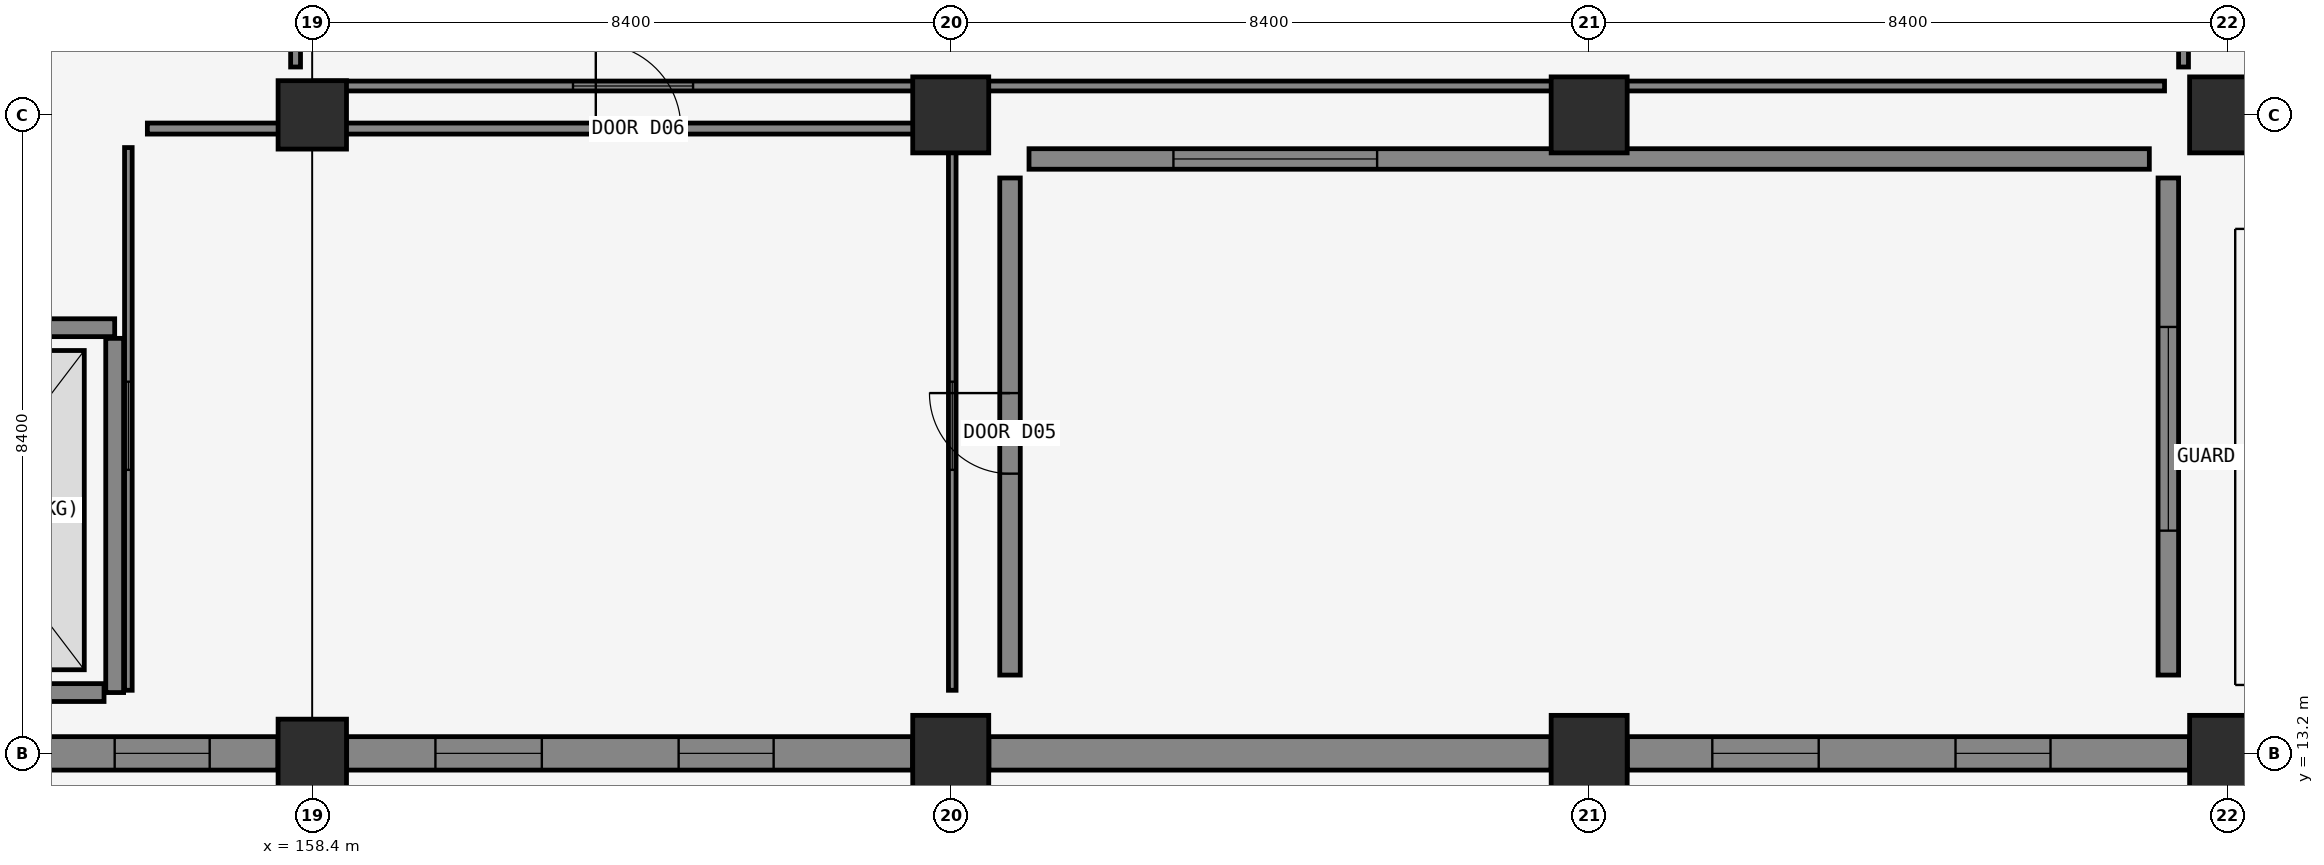
"""IFC4 building model, lengths in metres.
Left out: names, types, materials, properties, quantities, classifications, styles, units other than length and angle.
Written with IfcOpenShell. Run it as: python <this file> out.ifc"""

import sys

from ifc_helpers import new_model, si_unit, direction, frame, frame_2d, origin, origin_2d, place, context, subcontext, project, spatial, rectangle, extrude, element, fill, save


model = new_model("IFC4")
c1 = context("Model", 3, precision=1e-05, world=origin(), true_north=direction((0.0, 1.0)))
c2 = subcontext(c1, "Body", "Model", "MODEL_VIEW")
j1 = project(units=[si_unit("LENGTHUNIT", "METRE"), si_unit("PLANEANGLEUNIT", "RADIAN")], contexts=[c1])
p1 = place(None, origin())
s1 = spatial("IfcSite", under=j1, at=p1, CompositionType="ELEMENT")
p2 = place(p1, origin())
s2 = spatial("IfcBuilding", under=s1, at=p2, CompositionType="ELEMENT")
p3 = place(p2, origin())
s3 = spatial("IfcBuildingStorey", under=s2, at=p3, CompositionType="ELEMENT", Elevation=0.0)
for number, where, z_axis, x_axis in (
    (1, (158.4, 13.2, 0.0), (0.0, 0.0, 1.0), (1.0, 0.0, 0.0)),
    (2, (158.4, 21.6, 0.0), (0.0, 0.0, 1.0), (1.0, 0.0, 0.0)),
):
    element("IfcColumn", number, at=place(p3, frame(where, z_axis=z_axis, x_axis=x_axis)), inside=s3, PredefinedType="COLUMN", context=c2, shape_type="SweptSolid", body=[
        extrude(rectangle(XDim=0.9, YDim=0.9, at=origin_2d()), origin(), (0.0, 0.0, 1.0), 5.4),
    ])
for number, where, z_axis, x_axis in (
    (3, (166.8, 13.2, 0.0), (0.0, 0.0, 1.0), (1.0, 0.0, 0.0)),
    (4, (166.8, 21.6, 0.0), (0.0, 0.0, 1.0), (1.0, 0.0, 0.0)),
    (5, (175.2, 13.2, 0.0), (0.0, 0.0, 1.0), (1.0, 0.0, 0.0)),
    (6, (175.2, 21.6, 0.0), (0.0, 0.0, 1.0), (1.0, 0.0, 0.0)),
    (7, (183.6, 13.2, 0.0), (0.0, 0.0, 1.0), (1.0, 0.0, 0.0)),
    (8, (183.6, 21.6, 0.0), (0.0, 0.0, 1.0), (1.0, 0.0, 0.0)),
):
    element("IfcColumn", number, at=place(p3, frame(where, z_axis=z_axis, x_axis=x_axis)), inside=s3, PredefinedType="COLUMN", context=c2, shape_type="SweptSolid", body=[
        extrude(rectangle(XDim=1.0, YDim=1.0, at=origin_2d()), origin(), (0.0, 0.0, 1.0), 5.4),
    ])
p4 = place(p3, frame((151.412, 13.2, 0.0), z_axis=(0.0, 0.0, 1.0), x_axis=(1.0, 0.0, 0.0)))
e9 = element("IfcWall", 9, at=p4, inside=s3, PredefinedType="SOLIDWALL", context=c2, shape_type="SweptSolid", body=[
    extrude(rectangle(XDim=6.536, YDim=0.44, at=frame_2d((3.268, 0.0))), origin(), (0.0, 0.0, 1.0), 4.44),
])
p5 = place(p4, frame((1.188, 0.0, 0.9)))
e10 = element("IfcOpeningElement", 10, at=p5, cuts=e9, PredefinedType="OPENING", context=c2, shape_type="SweptSolid", body=[
    extrude(rectangle(XDim=1.4, YDim=2.2, at=frame_2d((0.7, 1.1))), frame((0.0, 0.23, 0.0), z_axis=(0.0, -1.0, 0.0), x_axis=(1.0, 0.0, 0.0)), (0.0, 0.0, 1.0), 0.46),
])
p6 = place(p4, frame((4.388, 0.0, 0.9)))
e11 = element("IfcOpeningElement", 11, at=p6, cuts=e9, PredefinedType="OPENING", context=c2, shape_type="SweptSolid", body=[
    extrude(rectangle(XDim=1.25, YDim=2.05, at=frame_2d((0.625, 1.025))), frame((0.0, 0.23, 0.0), z_axis=(0.0, -1.0, 0.0), x_axis=(1.0, 0.0, 0.0)), (0.0, 0.0, 1.0), 0.46),
])
p7 = place(p3, frame((158.852, 13.2, 0.0), z_axis=(0.0, 0.0, 1.0), x_axis=(1.0, 0.0, 0.0)))
e12 = element("IfcWall", 12, at=p7, inside=s3, PredefinedType="SOLIDWALL", context=c2, shape_type="SweptSolid", body=[
    extrude(rectangle(XDim=7.446, YDim=0.44, at=frame_2d((3.723, 0.0))), origin(), (0.0, 0.0, 1.0), 4.69),
])
p8 = place(p7, frame((1.168, 0.0, 0.9)))
e13 = element("IfcOpeningElement", 13, at=p8, cuts=e12, PredefinedType="OPENING", context=c2, shape_type="SweptSolid", body=[
    extrude(rectangle(XDim=1.4, YDim=2.2, at=frame_2d((0.7, 1.1))), frame((0.0, 0.23, 0.0), z_axis=(0.0, -1.0, 0.0), x_axis=(1.0, 0.0, 0.0)), (0.0, 0.0, 1.0), 0.46),
])
p9 = place(p7, frame((4.368, 0.0, 0.9)))
e14 = element("IfcOpeningElement", 14, at=p9, cuts=e12, PredefinedType="OPENING", context=c2, shape_type="SweptSolid", body=[
    extrude(rectangle(XDim=1.25, YDim=2.05, at=frame_2d((0.625, 1.025))), frame((0.0, 0.23, 0.0), z_axis=(0.0, -1.0, 0.0), x_axis=(1.0, 0.0, 0.0)), (0.0, 0.0, 1.0), 0.46),
])
p10 = place(p3, frame((167.302, 13.2, 0.0), z_axis=(0.0, 0.0, 1.0), x_axis=(1.0, 0.0, 0.0)))
e15 = element("IfcWall", 15, at=p10, inside=s3, PredefinedType="SOLIDWALL", context=c2, shape_type="SweptSolid", body=[
    extrude(rectangle(XDim=7.396, YDim=0.44, at=frame_2d((3.698, 0.0))), origin(), (0.0, 0.0, 1.0), 3.405),
])
p11 = place(p3, frame((175.702, 13.2, 0.0), z_axis=(0.0, 0.0, 1.0), x_axis=(1.0, 0.0, 0.0)))
e16 = element("IfcWall", 16, at=p11, inside=s3, PredefinedType="SOLIDWALL", context=c2, shape_type="SweptSolid", body=[
    extrude(rectangle(XDim=7.396, YDim=0.44, at=frame_2d((3.698, 0.0))), origin(), (0.0, 0.0, 1.0), 4.69),
])
p12 = place(p11, frame((1.118, 0.0, 0.9)))
e17 = element("IfcOpeningElement", 17, at=p12, cuts=e16, PredefinedType="OPENING", context=c2, shape_type="SweptSolid", body=[
    extrude(rectangle(XDim=1.4, YDim=2.2, at=frame_2d((0.7, 1.1))), frame((0.0, 0.23, 0.0), z_axis=(0.0, -1.0, 0.0), x_axis=(1.0, 0.0, 0.0)), (0.0, 0.0, 1.0), 0.46),
])
p13 = place(p11, frame((4.318, 0.0, 0.9)))
e18 = element("IfcOpeningElement", 18, at=p13, cuts=e16, PredefinedType="OPENING", context=c2, shape_type="SweptSolid", body=[
    extrude(rectangle(XDim=1.25, YDim=2.05, at=frame_2d((0.625, 1.025))), frame((0.0, 0.23, 0.0), z_axis=(0.0, -1.0, 0.0), x_axis=(1.0, 0.0, 0.0)), (0.0, 0.0, 1.0), 0.46),
])
p14 = place(p3, frame((151.8, 18.8, 0.0), z_axis=(0.0, 0.0, 1.0), x_axis=(1.0, 0.0, 0.0)))
e19 = element("IfcWall", 19, at=p14, inside=s3, PredefinedType="PARTITIONING", context=c2, shape_type="SweptSolid", body=[
    extrude(rectangle(XDim=4.0, YDim=0.235, at=frame_2d((2.0, 0.0))), origin(), (0.0, 0.0, 1.0), 5.04),
])
p15 = place(p14, frame((0.8, 0.0, 0.0)))
e20 = element("IfcOpeningElement", 20, at=p15, cuts=e19, PredefinedType="OPENING", context=c2, shape_type="SweptSolid", body=[
    extrude(rectangle(XDim=2.36, YDim=2.78, at=frame_2d((1.18, 1.39))), frame((0.0, 0.127, 0.0), z_axis=(0.0, -1.0, 0.0), x_axis=(1.0, 0.0, 0.0)), (0.0, 0.0, 1.0), 0.255),
])
p16 = place(p3, frame((155.8, 14.0, 0.0), z_axis=(0.0, 0.0, 1.0), x_axis=(0.0, 1.0, 0.0)))
e21 = element("IfcWall", 21, at=p16, inside=s3, PredefinedType="PARTITIONING", context=c2, shape_type="SweptSolid", body=[
    extrude(rectangle(XDim=4.66, YDim=0.235, at=frame_2d((2.33, 0.0))), origin(), (0.0, 0.0, 1.0), 5.04),
])
p17 = place(p3, frame((151.94, 14.0, 0.0), z_axis=(0.0, 0.0, 1.0), x_axis=(1.0, 0.0, 0.0)))
e22 = element("IfcWall", 22, at=p17, inside=s3, PredefinedType="PARTITIONING", context=c2, shape_type="SweptSolid", body=[
    extrude(rectangle(XDim=3.72, YDim=0.235, at=frame_2d((1.86, 0.0))), origin(), (0.0, 0.0, 1.0), 5.04),
])
p18 = place(p3, frame((167.58, 14.23, 0.0), z_axis=(0.0, 0.0, 1.0), x_axis=(0.0, 1.0, 0.0)))
e23 = element("IfcWall", 23, at=p18, inside=s3, PredefinedType="PARTITIONING", context=c2, shape_type="SweptSolid", body=[
    extrude(rectangle(XDim=6.54, YDim=0.27, at=frame_2d((3.27, 0.0))), origin(), (0.0, 0.0, 1.0), 5.04),
])
p19 = place(p18, frame((2.65, 0.0, 0.0)))
e24 = element("IfcOpeningElement", 24, at=p19, cuts=e23, PredefinedType="OPENING", context=c2, shape_type="SweptSolid", body=[
    extrude(rectangle(XDim=1.06, YDim=2.2, at=frame_2d((0.53, 1.1))), frame((0.0, 0.145, 0.0), z_axis=(0.0, -1.0, 0.0), x_axis=(1.0, 0.0, 0.0)), (0.0, 0.0, 1.0), 0.29),
])
p20 = place(p3, frame((167.83, 21.02, 0.0), z_axis=(0.0, 0.0, 1.0), x_axis=(1.0, 0.0, 0.0)))
e25 = element("IfcWall", 25, at=p20, inside=s3, PredefinedType="PARTITIONING", context=c2, shape_type="SweptSolid", body=[
    extrude(rectangle(XDim=14.74, YDim=0.27, at=frame_2d((7.37, 0.0))), origin(), (0.0, 0.0, 1.0), 5.04),
])
p21 = place(p20, frame((1.9, 0.0, 0.9)))
e26 = element("IfcOpeningElement", 26, at=p21, cuts=e25, PredefinedType="OPENING", context=c2, shape_type="SweptSolid", body=[
    extrude(rectangle(XDim=2.68, YDim=1.52, at=frame_2d((1.34, 0.76))), frame((0.0, 0.145, 0.0), z_axis=(0.0, -1.0, 0.0), x_axis=(1.0, 0.0, 0.0)), (0.0, 0.0, 1.0), 0.29),
])
p22 = place(p3, frame((182.82, 14.23, 0.0), z_axis=(0.0, 0.0, 1.0), x_axis=(0.0, 1.0, 0.0)))
e27 = element("IfcWall", 27, at=p22, inside=s3, PredefinedType="PARTITIONING", context=c2, shape_type="SweptSolid", body=[
    extrude(rectangle(XDim=6.54, YDim=0.27, at=frame_2d((3.27, 0.0))), origin(), (0.0, 0.0, 1.0), 5.04),
])
p23 = place(p22, frame((1.9, 0.0, 0.9)))
e28 = element("IfcOpeningElement", 28, at=p23, cuts=e27, PredefinedType="OPENING", context=c2, shape_type="SweptSolid", body=[
    extrude(rectangle(XDim=2.68, YDim=1.52, at=frame_2d((1.34, 0.76))), frame((0.0, 0.145, 0.0), z_axis=(0.0, -1.0, 0.0), x_axis=(1.0, 0.0, 0.0)), (0.0, 0.0, 1.0), 0.29),
])
p24 = place(p3, frame((156.23, 21.42, 0.0), z_axis=(0.0, 0.0, 1.0), x_axis=(1.0, 0.0, 0.0)))
e29 = element("IfcWall", 29, at=p24, inside=s3, PredefinedType="PARTITIONING", context=c2, shape_type="SweptSolid", body=[
    extrude(rectangle(XDim=10.34, YDim=0.145, at=frame_2d((5.17, 0.0))), origin(), (0.0, 0.0, 1.0), 4.29),
])
p25 = place(p24, frame((5.9, 0.0, 0.0)))
e30 = element("IfcOpeningElement", 30, at=p25, cuts=e29, PredefinedType="OPENING", context=c2, shape_type="SweptSolid", body=[
    extrude(rectangle(XDim=1.12, YDim=2.22, at=frame_2d((0.56, 1.11))), frame((0.0, 0.083, 0.0), z_axis=(0.0, -1.0, 0.0), x_axis=(1.0, 0.0, 0.0)), (0.0, 0.0, 1.0), 0.165),
])
p26 = place(p3, frame((155.98, 14.03, 0.0), z_axis=(0.0, 0.0, 1.0), x_axis=(0.0, 1.0, 0.0)))
e31 = element("IfcWall", 31, at=p26, inside=s3, PredefinedType="PARTITIONING", context=c2, shape_type="SweptSolid", body=[
    extrude(rectangle(XDim=7.14, YDim=0.1, at=frame_2d((3.57, 0.0))), origin(), (0.0, 0.0, 1.0), 5.04),
])
p27 = place(p26, frame((2.9, 0.0, 0.9)))
e32 = element("IfcOpeningElement", 32, at=p27, cuts=e31, PredefinedType="OPENING", context=c2, shape_type="SweptSolid", body=[
    extrude(rectangle(XDim=1.16, YDim=1.62, at=frame_2d((0.58, 0.81))), frame((0.0, 0.06, 0.0), z_axis=(0.0, -1.0, 0.0), x_axis=(1.0, 0.0, 0.0)), (0.0, 0.0, 1.0), 0.12),
])
p28 = place(p3, frame((166.82, 14.03, 0.0), z_axis=(0.0, 0.0, 1.0), x_axis=(0.0, 1.0, 0.0)))
e33 = element("IfcWall", 33, at=p28, inside=s3, PredefinedType="PARTITIONING", context=c2, shape_type="SweptSolid", body=[
    extrude(rectangle(XDim=7.14, YDim=0.1, at=frame_2d((3.57, 0.0))), origin(), (0.0, 0.0, 1.0), 4.65),
])
p29 = place(p28, frame((2.9, 0.0, 0.9)))
e34 = element("IfcOpeningElement", 34, at=p29, cuts=e33, PredefinedType="OPENING", context=c2, shape_type="SweptSolid", body=[
    extrude(rectangle(XDim=1.16, YDim=1.62, at=frame_2d((0.58, 0.81))), frame((0.0, 0.06, 0.0), z_axis=(0.0, -1.0, 0.0), x_axis=(1.0, 0.0, 0.0)), (0.0, 0.0, 1.0), 0.12),
])
p30 = place(p3, frame((158.18, 22.23, 0.0), z_axis=(0.0, 0.0, 1.0), x_axis=(0.0, 1.0, 0.0)))
e35 = element("IfcWall", 35, at=p30, inside=s3, PredefinedType="PARTITIONING", context=c2, shape_type="SweptSolid", body=[
    extrude(rectangle(XDim=8.14, YDim=0.13, at=frame_2d((4.07, 0.0))), origin(), (0.0, 0.0, 1.0), 4.65),
])
p31 = place(p30, frame((3.65, 0.0, 0.0)))
e36 = element("IfcOpeningElement", 36, at=p31, cuts=e35, PredefinedType="OPENING", context=c2, shape_type="SweptSolid", body=[
    extrude(rectangle(XDim=1.24, YDim=2.28, at=frame_2d((0.62, 1.14))), frame((0.0, 0.075, 0.0), z_axis=(0.0, -1.0, 0.0), x_axis=(1.0, 0.0, 0.0)), (0.0, 0.0, 1.0), 0.15),
])
p32 = place(p3, frame((158.43, 21.98, 0.0), z_axis=(0.0, 0.0, 1.0), x_axis=(1.0, 0.0, 0.0)))
e37 = element("IfcWall", 37, at=p32, inside=s3, PredefinedType="PARTITIONING", context=c2, shape_type="SweptSolid", body=[
    extrude(rectangle(XDim=24.34, YDim=0.13, at=frame_2d((12.17, 0.0))), origin(), (0.0, 0.0, 1.0), 4.09),
])
p33 = place(p32, frame((3.4, 0.0, 0.9)))
e38 = element("IfcOpeningElement", 38, at=p33, cuts=e37, PredefinedType="OPENING", context=c2, shape_type="SweptSolid", body=[
    extrude(rectangle(XDim=1.58, YDim=1.24, at=frame_2d((0.79, 0.62))), frame((0.0, 0.075, 0.0), z_axis=(0.0, -1.0, 0.0), x_axis=(1.0, 0.0, 0.0)), (0.0, 0.0, 1.0), 0.15),
])
p34 = place(p3, frame((183.02, 22.23, 0.0), z_axis=(0.0, 0.0, 1.0), x_axis=(0.0, 1.0, 0.0)))
e39 = element("IfcWall", 39, at=p34, inside=s3, PredefinedType="PARTITIONING", context=c2, shape_type="SweptSolid", body=[
    extrude(rectangle(XDim=8.14, YDim=0.13, at=frame_2d((4.07, 0.0))), origin(), (0.0, 0.0, 1.0), 5.04),
])
p35 = place(p34, frame((3.4, 0.0, 0.9)))
e40 = element("IfcOpeningElement", 40, at=p35, cuts=e39, PredefinedType="OPENING", context=c2, shape_type="SweptSolid", body=[
    extrude(rectangle(XDim=1.58, YDim=1.24, at=frame_2d((0.79, 0.62))), frame((0.0, 0.075, 0.0), z_axis=(0.0, -1.0, 0.0), x_axis=(1.0, 0.0, 0.0)), (0.0, 0.0, 1.0), 0.15),
])
p36 = place(p6, origin())
e41 = element("IfcWindow", 41, at=p36, inside=s3, PartitioningType="SINGLE_PANEL", PredefinedType="WINDOW", context=c2, shape_type="SweptSolid", body=[
    extrude(rectangle(XDim=1.25, YDim=2.05, at=frame_2d((0.625, 1.025))), frame((0.0, 0.03, 0.0), z_axis=(0.0, -1.0, 0.0), x_axis=(1.0, 0.0, 0.0)), (0.0, 0.0, 1.0), 0.06),
])
fill(e11, e41)
p37 = place(p8, origin())
e42 = element("IfcWindow", 42, at=p37, inside=s3, PartitioningType="SINGLE_PANEL", PredefinedType="WINDOW", context=c2, shape_type="SweptSolid", body=[
    extrude(rectangle(XDim=1.4, YDim=2.2, at=frame_2d((0.7, 1.1))), frame((0.0, 0.03, 0.0), z_axis=(0.0, -1.0, 0.0), x_axis=(1.0, 0.0, 0.0)), (0.0, 0.0, 1.0), 0.06),
])
fill(e13, e42)
p38 = place(p9, origin())
e43 = element("IfcWindow", 43, at=p38, inside=s3, PartitioningType="SINGLE_PANEL", PredefinedType="WINDOW", context=c2, shape_type="SweptSolid", body=[
    extrude(rectangle(XDim=1.25, YDim=2.05, at=frame_2d((0.625, 1.025))), frame((0.0, 0.03, 0.0), z_axis=(0.0, -1.0, 0.0), x_axis=(1.0, 0.0, 0.0)), (0.0, 0.0, 1.0), 0.06),
])
fill(e14, e43)
p39 = place(p12, origin())
e44 = element("IfcWindow", 44, at=p39, inside=s3, PartitioningType="SINGLE_PANEL", PredefinedType="WINDOW", context=c2, shape_type="SweptSolid", body=[
    extrude(rectangle(XDim=1.4, YDim=2.2, at=frame_2d((0.7, 1.1))), frame((0.0, 0.03, 0.0), z_axis=(0.0, -1.0, 0.0), x_axis=(1.0, 0.0, 0.0)), (0.0, 0.0, 1.0), 0.06),
])
fill(e17, e44)
p40 = place(p13, origin())
e45 = element("IfcWindow", 45, at=p40, inside=s3, PartitioningType="SINGLE_PANEL", PredefinedType="WINDOW", context=c2, shape_type="SweptSolid", body=[
    extrude(rectangle(XDim=1.25, YDim=2.05, at=frame_2d((0.625, 1.025))), frame((0.0, 0.03, 0.0), z_axis=(0.0, -1.0, 0.0), x_axis=(1.0, 0.0, 0.0)), (0.0, 0.0, 1.0), 0.06),
])
fill(e18, e45)
p41 = place(p19, origin())
e46 = element("IfcDoor", 46, at=p41, inside=s3, OperationType="SINGLE_SWING_RIGHT", PredefinedType="DOOR", context=c2, shape_type="SweptSolid", body=[
    extrude(rectangle(XDim=1.06, YDim=2.2, at=frame_2d((0.53, 1.1))), frame((0.0, 0.025, 0.0), z_axis=(0.0, -1.0, 0.0), x_axis=(1.0, 0.0, 0.0)), (0.0, 0.0, 1.0), 0.05),
])
fill(e24, e46)
p42 = place(p21, origin())
e47 = element("IfcWindow", 47, at=p42, inside=s3, PartitioningType="SINGLE_PANEL", PredefinedType="WINDOW", context=c2, shape_type="SweptSolid", body=[
    extrude(rectangle(XDim=2.68, YDim=1.52, at=frame_2d((1.34, 0.76))), frame((0.0, 0.03, 0.0), z_axis=(0.0, -1.0, 0.0), x_axis=(1.0, 0.0, 0.0)), (0.0, 0.0, 1.0), 0.06),
])
fill(e26, e47)
p43 = place(p23, origin())
e48 = element("IfcWindow", 48, at=p43, inside=s3, PartitioningType="SINGLE_PANEL", PredefinedType="WINDOW", context=c2, shape_type="SweptSolid", body=[
    extrude(rectangle(XDim=2.68, YDim=1.52, at=frame_2d((1.34, 0.76))), frame((0.0, 0.03, 0.0), z_axis=(0.0, -1.0, 0.0), x_axis=(1.0, 0.0, 0.0)), (0.0, 0.0, 1.0), 0.06),
])
fill(e28, e48)
p44 = place(p25, origin())
e49 = element("IfcDoor", 49, at=p44, inside=s3, OperationType="SINGLE_SWING_LEFT", PredefinedType="DOOR", context=c2, shape_type="SweptSolid", body=[
    extrude(rectangle(XDim=1.12, YDim=2.22, at=frame_2d((0.56, 1.11))), frame((0.0, 0.025, 0.0), z_axis=(0.0, -1.0, 0.0), x_axis=(1.0, 0.0, 0.0)), (0.0, 0.0, 1.0), 0.05),
])
fill(e30, e49)
p45 = place(p27, origin())
e50 = element("IfcWindow", 50, at=p45, inside=s3, PartitioningType="SINGLE_PANEL", PredefinedType="WINDOW", context=c2, shape_type="SweptSolid", body=[
    extrude(rectangle(XDim=1.16, YDim=1.62, at=frame_2d((0.58, 0.81))), frame((0.0, 0.03, 0.0), z_axis=(0.0, -1.0, 0.0), x_axis=(1.0, 0.0, 0.0)), (0.0, 0.0, 1.0), 0.06),
])
fill(e32, e50)
p46 = place(p29, origin())
e51 = element("IfcWindow", 51, at=p46, inside=s3, PartitioningType="SINGLE_PANEL", PredefinedType="WINDOW", context=c2, shape_type="SweptSolid", body=[
    extrude(rectangle(XDim=1.16, YDim=1.62, at=frame_2d((0.58, 0.81))), frame((0.0, 0.03, 0.0), z_axis=(0.0, -1.0, 0.0), x_axis=(1.0, 0.0, 0.0)), (0.0, 0.0, 1.0), 0.06),
])
fill(e34, e51)
p47 = place(p33, origin())
e52 = element("IfcWindow", 52, at=p47, inside=s3, PartitioningType="SINGLE_PANEL", PredefinedType="WINDOW", context=c2, shape_type="SweptSolid", body=[
    extrude(rectangle(XDim=1.58, YDim=1.24, at=frame_2d((0.79, 0.62))), frame((0.0, 0.03, 0.0), z_axis=(0.0, -1.0, 0.0), x_axis=(1.0, 0.0, 0.0)), (0.0, 0.0, 1.0), 0.06),
])
fill(e38, e52)
save(model, sys.argv[1])
